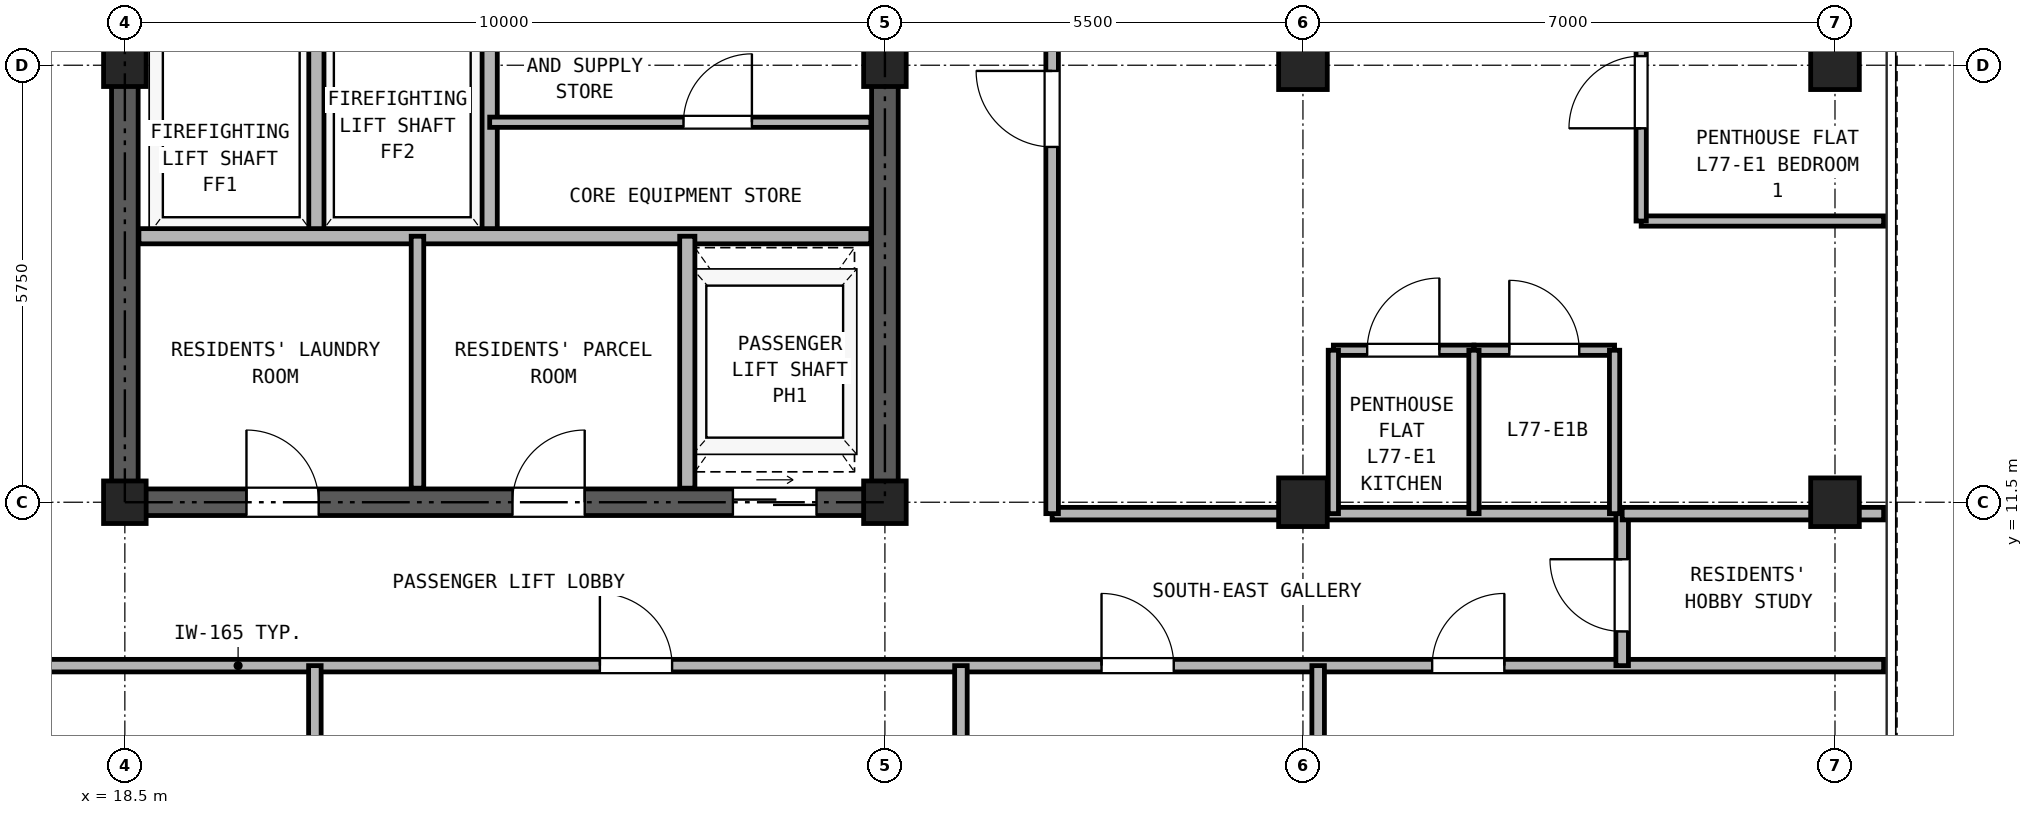
"""IFC4 building model, lengths in metres.
Left out: names, types, materials, properties, quantities, classifications, styles, units other than length and angle.
Written with IfcOpenShell. Run it as: python <this file> out.ifc"""

import sys

from ifc_helpers import new_model, si_unit, direction, frame, frame_2d, origin, origin_2d, place, context, subcontext, project, spatial, rectangle, hollow_rectangle, extrude, source, transform, mapped, element, fill, save


model = new_model("IFC4")
c1 = context("Model", 3, precision=1e-05, world=origin(), true_north=direction((0.0, 1.0)))
c2 = subcontext(c1, "Body", "Model", "MODEL_VIEW")
j1 = project(units=[si_unit("LENGTHUNIT", "METRE"), si_unit("PLANEANGLEUNIT", "RADIAN")], contexts=[c1])
p1 = place(None, origin())
s1 = spatial("IfcSite", under=j1, at=p1, CompositionType="ELEMENT")
p2 = place(p1, origin())
s2 = spatial("IfcBuilding", under=s1, at=p2, CompositionType="ELEMENT")
p3 = place(p2, frame((0.0, 0.0, 268.1)))
s3 = spatial("IfcBuildingStorey", under=s2, at=p3, CompositionType="ELEMENT", Elevation=268.1)
m1 = source(origin(), c2, "Body", "SweptSolid", [
    extrude(hollow_rectangle(XDim=0.64, YDim=0.64, WallThickness=0.035, at=origin_2d()), origin(), (0.0, 0.0, 1.0), 2.98),
])
for number, where, z_axis, x_axis in (
    (1, (41.0, 11.5, 0.0), (0.0, 0.0, 1.0), (1.0, 0.0, 0.0)),
    (2, (41.0, 17.25, 0.0), (0.0, 0.0, 1.0), (1.0, 0.0, 0.0)),
):
    element("IfcColumn", number, at=place(p3, frame(where, z_axis=z_axis, x_axis=x_axis)), inside=s3, PredefinedType="COLUMN", context=c2, shape_type="MappedRepresentation", body=[
        mapped(m1, transform((0.0, 0.0, 0.0), x_axis=(1.0, 0.0, 0.0), y_axis=(0.0, 1.0, 0.0), z_axis=(0.0, 0.0, 1.0), scale=1.0)),
    ])
m2 = source(origin(), c2, "Body", "SweptSolid", [
    extrude(hollow_rectangle(XDim=0.56, YDim=0.56, WallThickness=0.03, at=origin_2d()), origin(), (0.0, 0.0, 1.0), 2.98),
])
for number, where, z_axis, x_axis in (
    (3, (18.5, 11.5, 0.0), (0.0, 0.0, 1.0), (1.0, 0.0, 0.0)),
    (4, (18.5, 17.25, 0.0), (0.0, 0.0, 1.0), (1.0, 0.0, 0.0)),
    (5, (28.5, 11.5, 0.0), (0.0, 0.0, 1.0), (1.0, 0.0, 0.0)),
    (6, (28.5, 17.25, 0.0), (0.0, 0.0, 1.0), (1.0, 0.0, 0.0)),
):
    element("IfcColumn", number, at=place(p3, frame(where, z_axis=z_axis, x_axis=x_axis)), inside=s3, PredefinedType="COLUMN", context=c2, shape_type="MappedRepresentation", body=[
        mapped(m2, transform((0.0, 0.0, 0.0), x_axis=(1.0, 0.0, 0.0), y_axis=(0.0, 1.0, 0.0), z_axis=(0.0, 0.0, 1.0), scale=1.0)),
    ])
for number, where, z_axis, x_axis in (
    (7, (34.0, 11.5, 0.0), (0.0, 0.0, 1.0), (1.0, 0.0, 0.0)),
    (8, (34.0, 17.25, 0.0), (0.0, 0.0, 1.0), (1.0, 0.0, 0.0)),
):
    element("IfcColumn", number, at=place(p3, frame(where, z_axis=z_axis, x_axis=x_axis)), inside=s3, PredefinedType="COLUMN", context=c2, shape_type="MappedRepresentation", body=[
        mapped(m1, transform((0.0, 0.0, 0.0), x_axis=(1.0, 0.0, 0.0), y_axis=(0.0, 1.0, 0.0), z_axis=(0.0, 0.0, 1.0), scale=1.0)),
    ])
p4 = place(p3, frame((18.325, 11.5, 0.0), z_axis=(0.0, 0.0, 1.0), x_axis=(1.0, 0.0, 0.0)))
e9 = element("IfcWall", 9, at=p4, inside=s3, PredefinedType="SHEAR", context=c2, shape_type="SweptSolid", body=[
    extrude(rectangle(XDim=10.35, YDim=0.35, at=frame_2d((5.175, 0.0))), origin(), (0.0, 0.0, 1.0), 2.98),
])
p5 = place(p4, frame((1.775, 0.0, 0.0)))
e10 = element("IfcOpeningElement", 10, at=p5, cuts=e9, PredefinedType="OPENING", context=c2, shape_type="SweptSolid", body=[
    extrude(rectangle(XDim=0.95, YDim=2.15, at=frame_2d((0.475, 1.075))), frame((0.0, 0.185, 0.0), z_axis=(0.0, -1.0, 0.0), x_axis=(1.0, 0.0, 0.0)), (0.0, 0.0, 1.0), 0.37),
])
p6 = place(p4, frame((5.275, 0.0, 0.0)))
e11 = element("IfcOpeningElement", 11, at=p6, cuts=e9, PredefinedType="OPENING", context=c2, shape_type="SweptSolid", body=[
    extrude(rectangle(XDim=0.95, YDim=2.15, at=frame_2d((0.475, 1.075))), frame((0.0, 0.185, 0.0), z_axis=(0.0, -1.0, 0.0), x_axis=(1.0, 0.0, 0.0)), (0.0, 0.0, 1.0), 0.37),
])
p7 = place(p4, frame((8.175, 0.0, 0.0)))
e12 = element("IfcOpeningElement", 12, at=p7, cuts=e9, PredefinedType="OPENING", context=c2, shape_type="SweptSolid", body=[
    extrude(rectangle(XDim=1.1, YDim=2.25, at=frame_2d((0.55, 1.125))), frame((0.0, 0.185, 0.0), z_axis=(0.0, -1.0, 0.0), x_axis=(1.0, 0.0, 0.0)), (0.0, 0.0, 1.0), 0.37),
])
p8 = place(p3, frame((18.5, 11.675, 0.0), z_axis=(0.0, 0.0, 1.0), x_axis=(0.0, 1.0, 0.0)))
e13 = element("IfcWall", 13, at=p8, inside=s3, PredefinedType="SHEAR", context=c2, shape_type="SweptSolid", body=[
    extrude(rectangle(XDim=16.9, YDim=0.35, at=frame_2d((8.45, 0.0))), origin(), (0.0, 0.0, 1.0), 2.98),
])
p9 = place(p8, frame((7.475, 0.0, 0.0)))
e14 = element("IfcOpeningElement", 14, at=p9, cuts=e13, PredefinedType="OPENING", context=c2, shape_type="SweptSolid", body=[
    extrude(rectangle(XDim=1.15, YDim=2.2, at=frame_2d((0.575, 1.1))), frame((0.0, 0.185, 0.0), z_axis=(0.0, -1.0, 0.0), x_axis=(1.0, 0.0, 0.0)), (0.0, 0.0, 1.0), 0.37),
])
p10 = place(p3, frame((28.5, 11.675, 0.0), z_axis=(0.0, 0.0, 1.0), x_axis=(0.0, 1.0, 0.0)))
e15 = element("IfcWall", 15, at=p10, inside=s3, PredefinedType="SHEAR", context=c2, shape_type="SweptSolid", body=[
    extrude(rectangle(XDim=16.9, YDim=0.35, at=frame_2d((8.45, 0.0))), origin(), (0.0, 0.0, 1.0), 2.98),
])
p11 = place(p10, frame((7.475, 0.0, 0.0)))
e16 = element("IfcOpeningElement", 16, at=p11, cuts=e15, PredefinedType="OPENING", context=c2, shape_type="SweptSolid", body=[
    extrude(rectangle(XDim=1.15, YDim=2.2, at=frame_2d((0.575, 1.1))), frame((0.0, 0.185, 0.0), z_axis=(0.0, -1.0, 0.0), x_axis=(1.0, 0.0, 0.0)), (0.0, 0.0, 1.0), 0.37),
])
for number, where, z_axis, x_axis in (
    (17, (21.02, 15.0, 0.0), (0.0, 0.0, 1.0), (0.0, 1.0, 0.0)),
    (18, (23.3, 15.0, 0.0), (0.0, 0.0, 1.0), (0.0, 1.0, 0.0)),
):
    element("IfcWall", number, at=place(p3, frame(where, z_axis=z_axis, x_axis=x_axis)), inside=s3, PredefinedType="PARTITIONING", context=c2, shape_type="SweptSolid", body=[
        extrude(rectangle(XDim=3.0, YDim=0.2, at=frame_2d((1.5, 0.0))), origin(), (0.0, 0.0, 1.0), 2.98),
    ])
p12 = place(p3, frame((18.685, 15.0, 0.0), z_axis=(0.0, 0.0, 1.0), x_axis=(1.0, 0.0, 0.0)))
e19 = element("IfcWall", 19, at=p12, inside=s3, PredefinedType="PARTITIONING", context=c2, shape_type="SweptSolid", body=[
    extrude(rectangle(XDim=9.63, YDim=0.2, at=frame_2d((4.815, 0.0))), origin(), (0.0, 0.0, 1.0), 2.98),
])
p13 = place(p3, frame((23.3, 16.5, 0.0), z_axis=(0.0, 0.0, 1.0), x_axis=(1.0, 0.0, 0.0)))
e20 = element("IfcWall", 20, at=p13, inside=s3, PredefinedType="PARTITIONING", context=c2, shape_type="SweptSolid", body=[
    extrude(rectangle(XDim=5.015, YDim=0.135, at=frame_2d((2.507, 0.0))), origin(), (0.0, 0.0, 1.0), 2.98),
])
p14 = place(p13, frame((2.55, 0.0, 0.0)))
e21 = element("IfcOpeningElement", 21, at=p14, cuts=e20, PredefinedType="OPENING", context=c2, shape_type="SweptSolid", body=[
    extrude(rectangle(XDim=0.9, YDim=2.05, at=frame_2d((0.45, 1.025))), frame((0.0, 0.077, 0.0), z_axis=(0.0, -1.0, 0.0), x_axis=(1.0, 0.0, 0.0)), (0.0, 0.0, 1.0), 0.155),
])
p15 = place(p3, frame((22.35, 11.685, 0.0), z_axis=(0.0, 0.0, 1.0), x_axis=(0.0, 1.0, 0.0)))
e22 = element("IfcWall", 22, at=p15, inside=s3, PredefinedType="PARTITIONING", context=c2, shape_type="SweptSolid", body=[
    extrude(rectangle(XDim=3.315, YDim=0.165, at=frame_2d((1.657, 0.0))), origin(), (0.0, 0.0, 1.0), 2.98),
])
p16 = place(p3, frame((25.9, 11.685, 0.0), z_axis=(0.0, 0.0, 1.0), x_axis=(0.0, 1.0, 0.0)))
e23 = element("IfcWall", 23, at=p16, inside=s3, PredefinedType="PARTITIONING", context=c2, shape_type="SweptSolid", body=[
    extrude(rectangle(XDim=3.315, YDim=0.2, at=frame_2d((1.657, 0.0))), origin(), (0.0, 0.0, 1.0), 2.98),
])
p17 = place(p3, frame((5.36, 9.35, 0.0), z_axis=(0.0, 0.0, 1.0), x_axis=(1.0, 0.0, 0.0)))
e24 = element("IfcWall", 24, at=p17, inside=s3, PredefinedType="PARTITIONING", context=c2, shape_type="SweptSolid", body=[
    extrude(rectangle(XDim=36.28, YDim=0.165, at=frame_2d((18.14, 0.0))), origin(), (0.0, 0.0, 1.0), 2.98),
])
p18 = place(p17, frame((8.92, 0.0, 0.0)))
e25 = element("IfcOpeningElement", 25, at=p18, cuts=e24, PredefinedType="OPENING", context=c2, shape_type="SweptSolid", body=[
    extrude(rectangle(XDim=0.95, YDim=2.15, at=frame_2d((0.475, 1.075))), frame((0.0, 0.093, 0.0), z_axis=(0.0, -1.0, 0.0), x_axis=(1.0, 0.0, 0.0)), (0.0, 0.0, 1.0), 0.185),
])
p19 = place(p17, frame((19.39, 0.0, 0.0)))
e26 = element("IfcOpeningElement", 26, at=p19, cuts=e24, PredefinedType="OPENING", context=c2, shape_type="SweptSolid", body=[
    extrude(rectangle(XDim=0.95, YDim=2.15, at=frame_2d((0.475, 1.075))), frame((0.0, 0.093, 0.0), z_axis=(0.0, -1.0, 0.0), x_axis=(1.0, 0.0, 0.0)), (0.0, 0.0, 1.0), 0.185),
])
p20 = place(p17, frame((25.99, 0.0, 0.0)))
e27 = element("IfcOpeningElement", 27, at=p20, cuts=e24, PredefinedType="OPENING", context=c2, shape_type="SweptSolid", body=[
    extrude(rectangle(XDim=0.95, YDim=2.15, at=frame_2d((0.475, 1.075))), frame((0.0, 0.093, 0.0), z_axis=(0.0, -1.0, 0.0), x_axis=(1.0, 0.0, 0.0)), (0.0, 0.0, 1.0), 0.185),
])
p21 = place(p17, frame((30.34, 0.0, 0.0)))
e28 = element("IfcOpeningElement", 28, at=p21, cuts=e24, PredefinedType="OPENING", context=c2, shape_type="SweptSolid", body=[
    extrude(rectangle(XDim=0.95, YDim=2.15, at=frame_2d((0.475, 1.075))), frame((0.0, 0.093, 0.0), z_axis=(0.0, -1.0, 0.0), x_axis=(1.0, 0.0, 0.0)), (0.0, 0.0, 1.0), 0.185),
])
p22 = place(p3, frame((30.7, 11.35, 0.0), z_axis=(0.0, 0.0, 1.0), x_axis=(1.0, 0.0, 0.0)))
e29 = element("IfcWall", 29, at=p22, inside=s3, PredefinedType="PARTITIONING", context=c2, shape_type="SweptSolid", body=[
    extrude(rectangle(XDim=7.5, YDim=0.165, at=frame_2d((3.75, 0.0))), origin(), (0.0, 0.0, 1.0), 2.428),
])
p23 = place(p3, frame((38.2, 9.35, 0.0), z_axis=(0.0, 0.0, 1.0), x_axis=(0.0, 1.0, 0.0)))
e30 = element("IfcWall", 30, at=p23, inside=s3, PredefinedType="PARTITIONING", context=c2, shape_type="SweptSolid", body=[
    extrude(rectangle(XDim=2.0, YDim=0.165, at=frame_2d((1.0, 0.0))), origin(), (0.0, 0.0, 1.0), 2.98),
])
p24 = place(p23, frame((0.45, 0.0, 0.0)))
e31 = element("IfcOpeningElement", 31, at=p24, cuts=e30, PredefinedType="OPENING", context=c2, shape_type="SweptSolid", body=[
    extrude(rectangle(XDim=0.95, YDim=2.15, at=frame_2d((0.475, 1.075))), frame((0.0, 0.093, 0.0), z_axis=(0.0, -1.0, 0.0), x_axis=(1.0, 0.0, 0.0)), (0.0, 0.0, 1.0), 0.185),
])
p25 = place(p3, frame((30.7, 11.35, 0.0), z_axis=(0.0, 0.0, 1.0), x_axis=(0.0, 1.0, 0.0)))
e32 = element("IfcWall", 32, at=p25, inside=s3, PredefinedType="PARTITIONING", context=c2, shape_type="SweptSolid", body=[
    extrude(rectangle(XDim=23.79, YDim=0.165, at=frame_2d((11.895, 0.0))), origin(), (0.0, 0.0, 1.0), 2.98),
])
p26 = place(p25, frame((4.825, 0.0, 0.0)))
e33 = element("IfcOpeningElement", 33, at=p26, cuts=e32, PredefinedType="OPENING", context=c2, shape_type="SweptSolid", body=[
    extrude(rectangle(XDim=1.0, YDim=2.15, at=frame_2d((0.5, 1.075))), frame((0.0, 0.093, 0.0), z_axis=(0.0, -1.0, 0.0), x_axis=(1.0, 0.0, 0.0)), (0.0, 0.0, 1.0), 0.185),
])
p27 = place(p25, frame((14.475, 0.0, 0.0)))
e34 = element("IfcOpeningElement", 34, at=p27, cuts=e32, PredefinedType="OPENING", context=c2, shape_type="SweptSolid", body=[
    extrude(rectangle(XDim=1.0, YDim=2.15, at=frame_2d((0.5, 1.075))), frame((0.0, 0.093, 0.0), z_axis=(0.0, -1.0, 0.0), x_axis=(1.0, 0.0, 0.0)), (0.0, 0.0, 1.0), 0.185),
])
for number, where, z_axis, x_axis in (
    (35, (21.0, 0.16, 0.0), (0.0, 0.0, 1.0), (0.0, 1.0, 0.0)),
    (36, (29.5, 0.16, 0.0), (0.0, 0.0, 1.0), (0.0, 1.0, 0.0)),
):
    element("IfcWall", number, at=place(p3, frame(where, z_axis=z_axis, x_axis=x_axis)), inside=s3, PredefinedType="PARTITIONING", context=c2, shape_type="SweptSolid", body=[
        extrude(rectangle(XDim=9.19, YDim=0.165, at=frame_2d((4.595, 0.0))), origin(), (0.0, 0.0, 1.0), 2.98),
    ])
p28 = place(p3, frame((34.2, 0.16, 0.0), z_axis=(0.0, 0.0, 1.0), x_axis=(0.0, 1.0, 0.0)))
e37 = element("IfcWall", 37, at=p28, inside=s3, PredefinedType="PARTITIONING", context=c2, shape_type="SweptSolid", body=[
    extrude(rectangle(XDim=9.19, YDim=0.165, at=frame_2d((4.595, 0.0))), origin(), (0.0, 0.0, 1.0), 2.428),
])
p29 = place(p3, frame((38.2, 11.35, 0.0), z_axis=(0.0, 0.0, 1.0), x_axis=(1.0, 0.0, 0.0)))
e38 = element("IfcWall", 38, at=p29, inside=s3, PredefinedType="PARTITIONING", context=c2, shape_type="SweptSolid", body=[
    extrude(rectangle(XDim=3.44, YDim=0.165, at=frame_2d((1.72, 0.0))), origin(), (0.0, 0.0, 1.0), 2.428),
])
p30 = place(p3, frame((34.4, 13.5, 0.0), z_axis=(0.0, 0.0, 1.0), x_axis=(1.0, 0.0, 0.0)))
e39 = element("IfcWall", 39, at=p30, inside=s3, PredefinedType="PARTITIONING", context=c2, shape_type="SweptSolid", body=[
    extrude(rectangle(XDim=1.85, YDim=0.135, at=frame_2d((0.925, 0.0))), origin(), (0.0, 0.0, 1.0), 2.98),
])
p31 = place(p30, frame((0.445, 0.0, 0.0)))
e40 = element("IfcOpeningElement", 40, at=p31, cuts=e39, PredefinedType="OPENING", context=c2, shape_type="SweptSolid", body=[
    extrude(rectangle(XDim=0.95, YDim=2.15, at=frame_2d((0.475, 1.075))), frame((0.0, 0.077, 0.0), z_axis=(0.0, -1.0, 0.0), x_axis=(1.0, 0.0, 0.0)), (0.0, 0.0, 1.0), 0.155),
])
p32 = place(p3, frame((36.25, 13.5, 0.0), z_axis=(0.0, 0.0, 1.0), x_axis=(1.0, 0.0, 0.0)))
e41 = element("IfcWall", 41, at=p32, inside=s3, PredefinedType="PARTITIONING", context=c2, shape_type="SweptSolid", body=[
    extrude(rectangle(XDim=1.85, YDim=0.135, at=frame_2d((0.925, 0.0))), origin(), (0.0, 0.0, 1.0), 2.98),
])
p33 = place(p32, frame((0.465, 0.0, 0.0)))
e42 = element("IfcOpeningElement", 42, at=p33, cuts=e41, PredefinedType="OPENING", context=c2, shape_type="SweptSolid", body=[
    extrude(rectangle(XDim=0.92, YDim=2.1, at=frame_2d((0.46, 1.05))), frame((0.0, 0.077, 0.0), z_axis=(0.0, -1.0, 0.0), x_axis=(1.0, 0.0, 0.0)), (0.0, 0.0, 1.0), 0.155),
])
for number, where, z_axis, x_axis in (
    (43, (34.4, 11.35, 0.0), (0.0, 0.0, 1.0), (0.0, 1.0, 0.0)),
    (44, (36.25, 11.35, 0.0), (0.0, 0.0, 1.0), (0.0, 1.0, 0.0)),
    (45, (38.1, 11.35, 0.0), (0.0, 0.0, 1.0), (0.0, 1.0, 0.0)),
):
    element("IfcWall", number, at=place(p3, frame(where, z_axis=z_axis, x_axis=x_axis)), inside=s3, PredefinedType="PARTITIONING", context=c2, shape_type="SweptSolid", body=[
        extrude(rectangle(XDim=2.15, YDim=0.135, at=frame_2d((1.075, 0.0))), origin(), (0.0, 0.0, 1.0), 2.98),
    ])
p34 = place(p3, frame((38.45, 15.2, 0.0), z_axis=(0.0, 0.0, 1.0), x_axis=(1.0, 0.0, 0.0)))
e46 = element("IfcWall", 46, at=p34, inside=s3, PredefinedType="PARTITIONING", context=c2, shape_type="SweptSolid", body=[
    extrude(rectangle(XDim=3.19, YDim=0.135, at=frame_2d((1.595, 0.0))), origin(), (0.0, 0.0, 1.0), 2.98),
])
p35 = place(p3, frame((38.45, 15.2, 0.0), z_axis=(0.0, 0.0, 1.0), x_axis=(0.0, 1.0, 0.0)))
e47 = element("IfcWall", 47, at=p35, inside=s3, PredefinedType="PARTITIONING", context=c2, shape_type="SweptSolid", body=[
    extrude(rectangle(XDim=3.4, YDim=0.135, at=frame_2d((1.7, 0.0))), origin(), (0.0, 0.0, 1.0), 2.98),
])
p36 = place(p35, frame((1.22, 0.0, 0.0)))
e48 = element("IfcOpeningElement", 48, at=p36, cuts=e47, PredefinedType="OPENING", context=c2, shape_type="SweptSolid", body=[
    extrude(rectangle(XDim=0.95, YDim=2.15, at=frame_2d((0.475, 1.075))), frame((0.0, 0.077, 0.0), z_axis=(0.0, -1.0, 0.0), x_axis=(1.0, 0.0, 0.0)), (0.0, 0.0, 1.0), 0.155),
])
p37 = place(p14, frame((0.9, 0.0, 0.0), z_axis=(0.0, 0.0, 1.0), x_axis=(-1.0, 0.0, 0.0)))
e49 = element("IfcDoor", 49, at=p37, inside=s3, OperationType="SINGLE_SWING_RIGHT", PredefinedType="DOOR", context=c2, shape_type="SweptSolid", body=[
    extrude(rectangle(XDim=0.9, YDim=2.05, at=frame_2d((0.45, 1.025))), frame((0.0, 0.025, 0.0), z_axis=(0.0, -1.0, 0.0), x_axis=(1.0, 0.0, 0.0)), (0.0, 0.0, 1.0), 0.05),
])
fill(e21, e49)
p38 = place(p5, frame((0.95, 0.0, 0.0), z_axis=(0.0, 0.0, 1.0), x_axis=(-1.0, 0.0, 0.0)))
e50 = element("IfcDoor", 50, at=p38, inside=s3, OperationType="SINGLE_SWING_LEFT", PredefinedType="DOOR", context=c2, shape_type="SweptSolid", body=[
    extrude(rectangle(XDim=0.95, YDim=2.15, at=frame_2d((0.475, 1.075))), frame((0.0, 0.025, 0.0), z_axis=(0.0, -1.0, 0.0), x_axis=(1.0, 0.0, 0.0)), (0.0, 0.0, 1.0), 0.05),
])
fill(e10, e50)
p39 = place(p6, frame((0.95, 0.0, 0.0), z_axis=(0.0, 0.0, 1.0), x_axis=(-1.0, 0.0, 0.0)))
e51 = element("IfcDoor", 51, at=p39, inside=s3, OperationType="SINGLE_SWING_RIGHT", PredefinedType="DOOR", context=c2, shape_type="SweptSolid", body=[
    extrude(rectangle(XDim=0.95, YDim=2.15, at=frame_2d((0.475, 1.075))), frame((0.0, 0.025, 0.0), z_axis=(0.0, -1.0, 0.0), x_axis=(1.0, 0.0, 0.0)), (0.0, 0.0, 1.0), 0.05),
])
fill(e11, e51)
p40 = place(p7, frame((1.1, 0.0, 0.0), z_axis=(0.0, 0.0, 1.0), x_axis=(-1.0, 0.0, 0.0)))
e52 = element("IfcDoor", 52, at=p40, inside=s3, OperationType="DOUBLE_DOOR_SLIDING", PredefinedType="DOOR", context=c2, shape_type="SweptSolid", body=[
    extrude(rectangle(XDim=1.1, YDim=2.25, at=frame_2d((0.55, 1.125))), frame((0.0, 0.025, 0.0), z_axis=(0.0, -1.0, 0.0), x_axis=(1.0, 0.0, 0.0)), (0.0, 0.0, 1.0), 0.05),
])
fill(e12, e52)
p41 = place(p19, frame((0.95, 0.0, 0.0), z_axis=(0.0, 0.0, 1.0), x_axis=(-1.0, 0.0, 0.0)))
e53 = element("IfcDoor", 53, at=p41, inside=s3, OperationType="SINGLE_SWING_LEFT", PredefinedType="DOOR", context=c2, shape_type="SweptSolid", body=[
    extrude(rectangle(XDim=0.95, YDim=2.15, at=frame_2d((0.475, 1.075))), frame((0.0, 0.025, 0.0), z_axis=(0.0, -1.0, 0.0), x_axis=(1.0, 0.0, 0.0)), (0.0, 0.0, 1.0), 0.05),
])
fill(e26, e53)
p42 = place(p20, frame((0.95, 0.0, 0.0), z_axis=(0.0, 0.0, 1.0), x_axis=(-1.0, 0.0, 0.0)))
e54 = element("IfcDoor", 54, at=p42, inside=s3, OperationType="SINGLE_SWING_LEFT", PredefinedType="DOOR", context=c2, shape_type="SweptSolid", body=[
    extrude(rectangle(XDim=0.95, YDim=2.15, at=frame_2d((0.475, 1.075))), frame((0.0, 0.025, 0.0), z_axis=(0.0, -1.0, 0.0), x_axis=(1.0, 0.0, 0.0)), (0.0, 0.0, 1.0), 0.05),
])
fill(e27, e54)
p43 = place(p21, frame((0.95, 0.0, 0.0), z_axis=(0.0, 0.0, 1.0), x_axis=(-1.0, 0.0, 0.0)))
e55 = element("IfcDoor", 55, at=p43, inside=s3, OperationType="SINGLE_SWING_RIGHT", PredefinedType="DOOR", context=c2, shape_type="SweptSolid", body=[
    extrude(rectangle(XDim=0.95, YDim=2.15, at=frame_2d((0.475, 1.075))), frame((0.0, 0.025, 0.0), z_axis=(0.0, -1.0, 0.0), x_axis=(1.0, 0.0, 0.0)), (0.0, 0.0, 1.0), 0.05),
])
fill(e28, e55)
p44 = place(p24, origin())
e56 = element("IfcDoor", 56, at=p44, inside=s3, OperationType="SINGLE_SWING_RIGHT", PredefinedType="DOOR", context=c2, shape_type="SweptSolid", body=[
    extrude(rectangle(XDim=0.95, YDim=2.15, at=frame_2d((0.475, 1.075))), frame((0.0, 0.025, 0.0), z_axis=(0.0, -1.0, 0.0), x_axis=(1.0, 0.0, 0.0)), (0.0, 0.0, 1.0), 0.05),
])
fill(e31, e56)
p45 = place(p31, origin())
e57 = element("IfcDoor", 57, at=p45, inside=s3, OperationType="SINGLE_SWING_RIGHT", PredefinedType="DOOR", context=c2, shape_type="SweptSolid", body=[
    extrude(rectangle(XDim=0.95, YDim=2.15, at=frame_2d((0.475, 1.075))), frame((0.0, 0.025, 0.0), z_axis=(0.0, -1.0, 0.0), x_axis=(1.0, 0.0, 0.0)), (0.0, 0.0, 1.0), 0.05),
])
fill(e40, e57)
p46 = place(p33, origin())
e58 = element("IfcDoor", 58, at=p46, inside=s3, OperationType="SINGLE_SWING_LEFT", PredefinedType="DOOR", context=c2, shape_type="SweptSolid", body=[
    extrude(rectangle(XDim=0.92, YDim=2.1, at=frame_2d((0.46, 1.05))), frame((0.0, 0.025, 0.0), z_axis=(0.0, -1.0, 0.0), x_axis=(1.0, 0.0, 0.0)), (0.0, 0.0, 1.0), 0.05),
])
fill(e42, e58)
p47 = place(p36, frame((0.95, 0.0, 0.0), z_axis=(0.0, 0.0, 1.0), x_axis=(-1.0, 0.0, 0.0)))
e59 = element("IfcDoor", 59, at=p47, inside=s3, OperationType="SINGLE_SWING_LEFT", PredefinedType="DOOR", context=c2, shape_type="SweptSolid", body=[
    extrude(rectangle(XDim=0.95, YDim=2.15, at=frame_2d((0.475, 1.075))), frame((0.0, 0.025, 0.0), z_axis=(0.0, -1.0, 0.0), x_axis=(1.0, 0.0, 0.0)), (0.0, 0.0, 1.0), 0.05),
])
fill(e48, e59)
p48 = place(p26, frame((1.0, 0.0, 0.0), z_axis=(0.0, 0.0, 1.0), x_axis=(-1.0, 0.0, 0.0)))
e60 = element("IfcDoor", 60, at=p48, inside=s3, OperationType="SINGLE_SWING_RIGHT", PredefinedType="DOOR", context=c2, shape_type="SweptSolid", body=[
    extrude(rectangle(XDim=1.0, YDim=2.15, at=frame_2d((0.5, 1.075))), frame((0.0, 0.025, 0.0), z_axis=(0.0, -1.0, 0.0), x_axis=(1.0, 0.0, 0.0)), (0.0, 0.0, 1.0), 0.05),
])
fill(e33, e60)
save(model, sys.argv[1])
